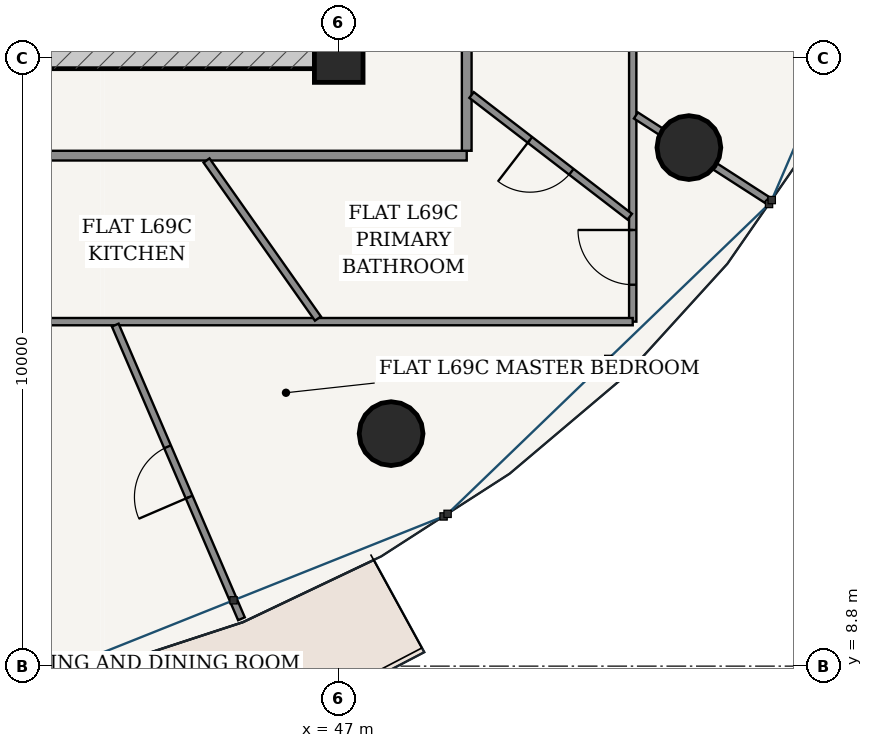
"""IFC4 building model, lengths in metres.
Left out: names, types, materials, properties, quantities, classifications, styles, units other than length and angle.
Written with IfcOpenShell. Run it as: python <this file> out.ifc"""

import sys

from ifc_helpers import new_model, si_unit, direction, frame, frame_2d, origin, origin_2d, place, context, subcontext, project, spatial, rectangle, hollow_circle, extrude, source, transform, mapped, element, fill, save


model = new_model("IFC4")
c1 = context("Model", 3, precision=1e-05, world=origin(), true_north=direction((-0.2419218956, 0.970295726276)))
c2 = subcontext(c1, "Body", "Model", "MODEL_VIEW")
j1 = project(units=[si_unit("LENGTHUNIT", "METRE"), si_unit("PLANEANGLEUNIT", "RADIAN")], contexts=[c1])
p1 = place(None, origin())
s1 = spatial("IfcSite", under=j1, at=p1, CompositionType="ELEMENT")
p2 = place(p1, origin())
s2 = spatial("IfcBuilding", under=s1, at=p2, CompositionType="ELEMENT")
p3 = place(p2, frame((0.0, 0.0, 263.2)))
s3 = spatial("IfcBuildingStorey", under=s2, at=p3, CompositionType="ELEMENT", Elevation=263.2)
p4 = place(p3, frame((47.0, 18.8, 0.0), z_axis=(0.0, 0.0, 1.0), x_axis=(1.0, 0.0, 0.0)))
e1 = element("IfcColumn", 1, at=p4, inside=s3, PredefinedType="COLUMN", context=c2, shape_type="SweptSolid", body=[
    extrude(rectangle(XDim=0.8, YDim=0.8, at=origin_2d()), origin(), (0.0, 0.0, 1.0), 3.75),
])
p5 = place(p3, frame((28.825, 18.9, 0.0), z_axis=(0.0, 0.0, 1.0), x_axis=(1.0, 0.0, 0.0)))
e2 = element("IfcWall", 2, at=p5, inside=s3, PredefinedType="SHEAR", context=c2, shape_type="SweptSolid", body=[
    extrude(rectangle(XDim=18.35, YDim=0.55, at=frame_2d((9.175, 0.0))), origin(), (0.0, 0.0, 1.0), 3.49),
])
p6 = place(p5, frame((8.75, 0.0, 0.0)))
e3 = element("IfcOpeningElement", 3, at=p6, cuts=e2, PredefinedType="OPENING", context=c2, shape_type="SweptSolid", body=[
    extrude(rectangle(XDim=0.85, YDim=2.1, at=frame_2d((0.425, 1.05))), frame((0.0, 0.285, 0.0), z_axis=(0.0, -1.0, 0.0), x_axis=(1.0, 0.0, 0.0)), (0.0, 0.0, 1.0), 0.57),
])
for number, where, z_axis, x_axis in (
    (4, (47.861, 12.624, 0.0), (0.0, 0.0, 1.0), (1.0, 0.0, 0.0)),
    (5, (52.759, 17.328, 0.0), (0.0, 0.0, 1.0), (1.0, 0.0, 0.0)),
):
    element("IfcColumn", number, at=place(p3, frame(where, z_axis=z_axis, x_axis=x_axis)), inside=s3, PredefinedType="COLUMN", context=c2, shape_type="SweptSolid", body=[
        extrude(hollow_circle(Radius=0.525, WallThickness=0.035, at=origin_2d()), origin(), (0.0, 0.0, 1.0), 3.75),
    ])
p7 = place(p3, frame((26.895, 17.195, 0.0), z_axis=(0.0, 0.0, 1.0), x_axis=(1.0, 0.0, 0.0)))
e6 = element("IfcWall", 6, at=p7, inside=s3, PredefinedType="PARTITIONING", context=c2, shape_type="SweptSolid", body=[
    extrude(rectangle(XDim=22.21, YDim=0.16, at=frame_2d((11.105, 0.0))), origin(), (0.0, 0.0, 1.0), 3.015),
])
p8 = place(p3, frame((49.105, 17.275, 0.0), z_axis=(0.0, 0.0, 1.0), x_axis=(0.0, 1.0, 0.0)))
e7 = element("IfcWall", 7, at=p8, inside=s3, PredefinedType="PARTITIONING", context=c2, shape_type="SweptSolid", body=[
    extrude(rectangle(XDim=13.925, YDim=0.16, at=frame_2d((6.962, 0.0))), origin(), (0.0, 0.0, 1.0), 3.015),
])
p9 = place(p8, frame((3.647, 0.0, 0.0)))
e8 = element("IfcOpeningElement", 8, at=p9, cuts=e7, PredefinedType="OPENING", context=c2, shape_type="SweptSolid", body=[
    extrude(rectangle(XDim=0.98, YDim=2.2, at=frame_2d((0.49, 1.1))), frame((0.0, 0.09, 0.0), z_axis=(0.0, -1.0, 0.0), x_axis=(1.0, 0.0, 0.0)), (0.0, 0.0, 1.0), 0.18),
])
p10 = place(p3, frame((51.835, 24.045, 0.0), z_axis=(0.0, 0.0, 1.0), x_axis=(0.0, -1.0, 0.0)))
e9 = element("IfcWall", 9, at=p10, inside=s3, PredefinedType="PARTITIONING", context=c2, shape_type="SweptSolid", body=[
    extrude(rectangle(XDim=9.58, YDim=0.12, at=frame_2d((4.79, 0.0))), origin(), (0.0, 0.0, 1.0), 3.015),
])
p11 = place(p10, frame((2.771, 0.0, 0.0)))
e10 = element("IfcOpeningElement", 10, at=p11, cuts=e9, PredefinedType="OPENING", context=c2, shape_type="SweptSolid", body=[
    extrude(rectangle(XDim=0.9, YDim=2.15, at=frame_2d((0.45, 1.075))), frame((0.0, 0.07, 0.0), z_axis=(0.0, -1.0, 0.0), x_axis=(1.0, 0.0, 0.0)), (0.0, 0.0, 1.0), 0.14),
])
p12 = place(p10, frame((8.073, 0.0, 0.0)))
e11 = element("IfcOpeningElement", 11, at=p12, cuts=e9, PredefinedType="OPENING", context=c2, shape_type="SweptSolid", body=[
    extrude(rectangle(XDim=0.9, YDim=2.15, at=frame_2d((0.45, 1.075))), frame((0.0, 0.07, 0.0), z_axis=(0.0, -1.0, 0.0), x_axis=(1.0, 0.0, 0.0)), (0.0, 0.0, 1.0), 0.14),
])
p13 = place(p3, frame((51.835, 14.465, 0.0), z_axis=(0.0, 0.0, 1.0), x_axis=(-1.0, 0.0, 0.0)))
e12 = element("IfcWall", 12, at=p13, inside=s3, PredefinedType="PARTITIONING", context=c2, shape_type="SweptSolid", body=[
    extrude(rectangle(XDim=16.278, YDim=0.12, at=frame_2d((8.139, 0.0))), origin(), (0.0, 0.0, 1.0), 3.015),
])
p14 = place(p13, frame((9.83, 0.0, 0.0)))
e13 = element("IfcOpeningElement", 13, at=p14, cuts=e12, PredefinedType="OPENING", context=c2, shape_type="SweptSolid", body=[
    extrude(rectangle(XDim=0.9, YDim=2.15, at=frame_2d((0.45, 1.075))), frame((0.0, 0.07, 0.0), z_axis=(0.0, -1.0, 0.0), x_axis=(1.0, 0.0, 0.0)), (0.0, 0.0, 1.0), 0.14),
])
p15 = place(p13, frame((13.554, 0.0, 0.0)))
e14 = element("IfcOpeningElement", 14, at=p15, cuts=e12, PredefinedType="OPENING", context=c2, shape_type="SweptSolid", body=[
    extrude(rectangle(XDim=0.9, YDim=2.15, at=frame_2d((0.45, 1.075))), frame((0.0, 0.07, 0.0), z_axis=(0.0, -1.0, 0.0), x_axis=(1.0, 0.0, 0.0)), (0.0, 0.0, 1.0), 0.14),
])
p16 = place(p3, frame((43.325, 14.408, 0.0), z_axis=(0.0, 0.0, 1.0), x_axis=(0.394816056217, -0.918760187292, 0.0)))
e15 = element("IfcWall", 15, at=p16, inside=s3, PredefinedType="PARTITIONING", context=c2, shape_type="SweptSolid", body=[
    extrude(rectangle(XDim=5.256, YDim=0.12, at=frame_2d((2.628, 0.0))), origin(), (0.0, 0.0, 1.0), 3.121),
])
p17 = place(p16, frame((2.178, 0.0, 0.0)))
e16 = element("IfcOpeningElement", 16, at=p17, cuts=e15, PredefinedType="OPENING", context=c2, shape_type="SweptSolid", body=[
    extrude(rectangle(XDim=0.9, YDim=2.15, at=frame_2d((0.45, 1.075))), frame((0.0, 0.07, 0.0), z_axis=(0.0, -1.0, 0.0), x_axis=(1.0, 0.0, 0.0)), (0.0, 0.0, 1.0), 0.14),
])
p18 = place(p3, frame((51.887, 17.856, 0.0), z_axis=(0.0, 0.0, 1.0), x_axis=(0.840708587197, -0.54148783127, 0.0)))
e17 = element("IfcWall", 17, at=p18, inside=s3, PredefinedType="PARTITIONING", context=c2, shape_type="SweptSolid", body=[
    extrude(rectangle(XDim=2.568, YDim=0.12, at=frame_2d((1.284, 0.0))), origin(), (0.0, 0.0, 1.0), 3.015),
])
p19 = place(p3, frame((44.826, 17.115, 0.0), z_axis=(0.0, 0.0, 1.0), x_axis=(0.57609227969, -0.817384661761, 0.0)))
e18 = element("IfcWall", 18, at=p19, inside=s3, PredefinedType="PARTITIONING", context=c2, shape_type="SweptSolid", body=[
    extrude(rectangle(XDim=3.18, YDim=0.12, at=frame_2d((1.59, 0.0))), origin(), (0.0, 0.0, 1.0), 3.209),
])
p20 = place(p3, frame((49.185, 18.192, 0.0), z_axis=(0.0, 0.0, 1.0), x_axis=(0.792502290575, -0.609868936275, 0.0)))
e19 = element("IfcWall", 19, at=p20, inside=s3, PredefinedType="PARTITIONING", context=c2, shape_type="SweptSolid", body=[
    extrude(rectangle(XDim=3.282, YDim=0.12, at=frame_2d((1.641, 0.0))), origin(), (0.0, 0.0, 1.0), 3.121),
])
p21 = place(p20, frame((1.211, 0.0, 0.0)))
e20 = element("IfcOpeningElement", 20, at=p21, cuts=e19, PredefinedType="OPENING", context=c2, shape_type="SweptSolid", body=[
    extrude(rectangle(XDim=0.86, YDim=2.15, at=frame_2d((0.43, 1.075))), frame((0.0, 0.07, 0.0), z_axis=(0.0, -1.0, 0.0), x_axis=(1.0, 0.0, 0.0)), (0.0, 0.0, 1.0), 0.14),
])
m1 = source(origin(), c2, "Body", "SweptSolid", [
    extrude(rectangle(XDim=0.86, YDim=2.15, at=frame_2d((0.43, 1.075))), frame((0.0, 0.025, 0.0), z_axis=(0.0, -1.0, 0.0), x_axis=(1.0, 0.0, 0.0)), (0.0, 0.0, 1.0), 0.05),
])
p22 = place(p21, frame((0.86, 0.0, 0.0), z_axis=(0.0, 0.0, 1.0), x_axis=(-1.0, 0.0, 0.0)))
e21 = element("IfcDoor", 21, at=p22, inside=s3, OperationType="SINGLE_SWING_RIGHT", PredefinedType="DOOR", context=c2, shape_type="MappedRepresentation", body=[
    mapped(m1, transform((0.0, 0.0, 0.0), scale=1.0)),
])
fill(e20, e21)
m2 = source(origin(), c2, "Body", "SweptSolid", [
    extrude(rectangle(XDim=0.9, YDim=2.15, at=frame_2d((0.45, 1.075))), frame((0.0, 0.025, 0.0), z_axis=(0.0, -1.0, 0.0), x_axis=(1.0, 0.0, 0.0)), (0.0, 0.0, 1.0), 0.05),
])
p23 = place(p12, frame((0.9, 0.0, 0.0), z_axis=(0.0, 0.0, 1.0), x_axis=(-1.0, 0.0, 0.0)))
e22 = element("IfcDoor", 22, at=p23, inside=s3, OperationType="SINGLE_SWING_RIGHT", PredefinedType="DOOR", context=c2, shape_type="MappedRepresentation", body=[
    mapped(m2, transform((0.0, 0.0, 0.0), scale=1.0)),
])
fill(e11, e22)
p24 = place(p17, frame((0.9, 0.0, 0.0), z_axis=(0.0, 0.0, 1.0), x_axis=(-1.0, 0.0, 0.0)))
e23 = element("IfcDoor", 23, at=p24, inside=s3, OperationType="SINGLE_SWING_LEFT", PredefinedType="DOOR", context=c2, shape_type="MappedRepresentation", body=[
    mapped(m2, transform((0.0, 0.0, 0.0), scale=1.0)),
])
fill(e16, e23)
save(model, sys.argv[1])
